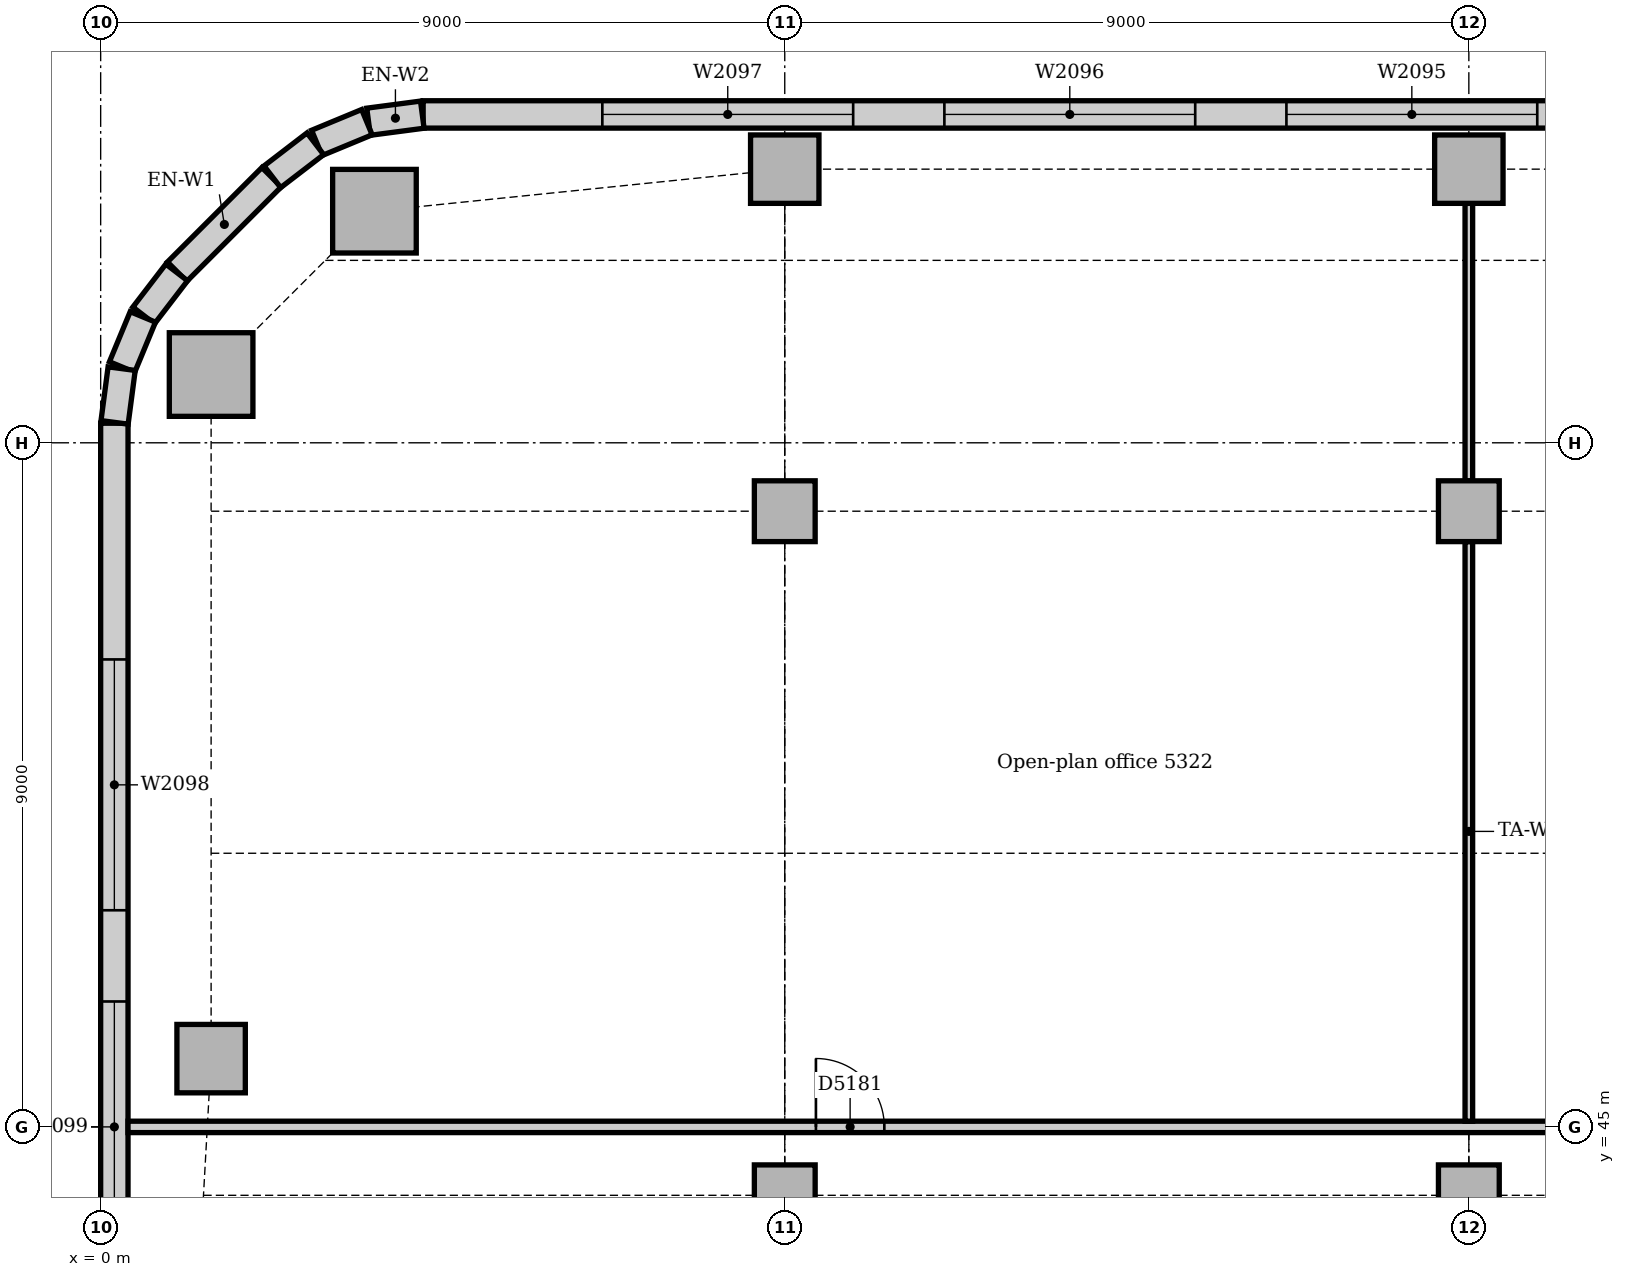
"""IFC4 building model, lengths in metres.
Left out: names, types, materials, properties, quantities, classifications, styles, units other than length and angle.
Written with IfcOpenShell. Run it as: python <this file> out.ifc"""

import sys

from ifc_helpers import new_model, si_unit, direction, frame, frame_2d, origin, origin_2d, place, context, subcontext, project, spatial, rectangle, extrude, element, fill, save


model = new_model("IFC4")
c1 = context("Model", 3, precision=1e-05, world=origin(), true_north=direction((0.0, 1.0)))
c2 = subcontext(c1, "Body", "Model", "MODEL_VIEW")
j1 = project(units=[si_unit("LENGTHUNIT", "METRE"), si_unit("PLANEANGLEUNIT", "RADIAN")], contexts=[c1])
p1 = place(None, origin())
s1 = spatial("IfcSite", under=j1, at=p1, CompositionType="ELEMENT")
p2 = place(p1, origin())
s2 = spatial("IfcBuilding", under=s1, at=p2, CompositionType="ELEMENT")
p3 = place(p2, frame((0.0, 0.0, 222.0)))
s3 = spatial("IfcBuildingStorey", under=s2, at=p3, CompositionType="ELEMENT", Elevation=222.0)
for number, where, z_axis, x_axis in (
    (1, (3.602, 57.047, 0.0), (0.0, 0.0, 1.0), (1.0, 0.0, 0.0)),
    (2, (1.453, 54.898, 0.0), (0.0, 0.0, 1.0), (1.0, 0.0, 0.0)),
):
    element("IfcColumn", number, at=place(p3, frame(where, z_axis=z_axis, x_axis=x_axis)), inside=s3, PredefinedType="COLUMN", context=c2, shape_type="SweptSolid", body=[
        extrude(rectangle(XDim=1.1, YDim=1.1, at=origin_2d()), origin(), (0.0, 0.0, 1.0), 3.85),
    ])
for number, where, z_axis, x_axis in (
    (3, (9.0, 57.6, 0.0), (0.0, 0.0, 1.0), (1.0, 0.0, 0.0)),
    (4, (18.0, 57.6, 0.0), (0.0, 0.0, 1.0), (1.0, 0.0, 0.0)),
    (5, (1.453, 45.898, 0.0), (0.0, 0.0, 1.0), (1.0, 0.0, 0.0)),
):
    element("IfcColumn", number, at=place(p3, frame(where, z_axis=z_axis, x_axis=x_axis)), inside=s3, PredefinedType="COLUMN", context=c2, shape_type="SweptSolid", body=[
        extrude(rectangle(XDim=0.9, YDim=0.9, at=origin_2d()), origin(), (0.0, 0.0, 1.0), 3.85),
    ])
for number, where, z_axis, x_axis in (
    (6, (9.0, 44.1, 0.0), (0.0, 0.0, 1.0), (1.0, 0.0, 0.0)),
    (7, (9.0, 53.1, 0.0), (0.0, 0.0, 1.0), (1.0, 0.0, 0.0)),
    (8, (18.0, 44.1, 0.0), (0.0, 0.0, 1.0), (1.0, 0.0, 0.0)),
    (9, (18.0, 53.1, 0.0), (0.0, 0.0, 1.0), (1.0, 0.0, 0.0)),
):
    element("IfcColumn", number, at=place(p3, frame(where, z_axis=z_axis, x_axis=x_axis)), inside=s3, PredefinedType="COLUMN", context=c2, shape_type="SweptSolid", body=[
        extrude(rectangle(XDim=0.8, YDim=0.8, at=origin_2d()), origin(), (0.0, 0.0, 1.0), 3.85),
    ])
p4 = place(p3, frame((34.757, 58.32, 0.0), z_axis=(0.0, 0.0, 1.0), x_axis=(-1.0, 0.0, 0.0)))
e10 = element("IfcWall", 10, at=p4, inside=s3, PredefinedType="STANDARD", context=c2, shape_type="SweptSolid", body=[
    extrude(rectangle(XDim=30.515, YDim=0.36, at=frame_2d((15.257, 0.0))), origin(), (0.0, 0.0, 1.0), 3.85),
])
p5 = place(p4, frame((2.357, 0.0, 0.9)))
e11 = element("IfcOpeningElement", 11, at=p5, cuts=e10, PredefinedType="OPENING", context=c2, shape_type="SweptSolid", body=[
    extrude(rectangle(XDim=3.3, YDim=1.6, at=frame_2d((1.65, 0.8))), frame((0.0, 0.19, 0.0), z_axis=(0.0, -1.0, 0.0), x_axis=(1.0, 0.0, 0.0)), (0.0, 0.0, 1.0), 0.38),
])
p6 = place(p4, frame((6.857, 0.0, 0.9)))
e12 = element("IfcOpeningElement", 12, at=p6, cuts=e10, PredefinedType="OPENING", context=c2, shape_type="SweptSolid", body=[
    extrude(rectangle(XDim=3.3, YDim=1.6, at=frame_2d((1.65, 0.8))), frame((0.0, 0.19, 0.0), z_axis=(0.0, -1.0, 0.0), x_axis=(1.0, 0.0, 0.0)), (0.0, 0.0, 1.0), 0.38),
])
p7 = place(p4, frame((11.357, 0.0, 0.9)))
e13 = element("IfcOpeningElement", 13, at=p7, cuts=e10, PredefinedType="OPENING", context=c2, shape_type="SweptSolid", body=[
    extrude(rectangle(XDim=3.3, YDim=1.6, at=frame_2d((1.65, 0.8))), frame((0.0, 0.19, 0.0), z_axis=(0.0, -1.0, 0.0), x_axis=(1.0, 0.0, 0.0)), (0.0, 0.0, 1.0), 0.38),
])
p8 = place(p4, frame((15.857, 0.0, 0.9)))
e14 = element("IfcOpeningElement", 14, at=p8, cuts=e10, PredefinedType="OPENING", context=c2, shape_type="SweptSolid", body=[
    extrude(rectangle(XDim=3.3, YDim=1.6, at=frame_2d((1.65, 0.8))), frame((0.0, 0.19, 0.0), z_axis=(0.0, -1.0, 0.0), x_axis=(1.0, 0.0, 0.0)), (0.0, 0.0, 1.0), 0.38),
])
p9 = place(p4, frame((20.357, 0.0, 0.9)))
e15 = element("IfcOpeningElement", 15, at=p9, cuts=e10, PredefinedType="OPENING", context=c2, shape_type="SweptSolid", body=[
    extrude(rectangle(XDim=3.3, YDim=1.6, at=frame_2d((1.65, 0.8))), frame((0.0, 0.19, 0.0), z_axis=(0.0, -1.0, 0.0), x_axis=(1.0, 0.0, 0.0)), (0.0, 0.0, 1.0), 0.38),
])
p10 = place(p4, frame((24.857, 0.0, 0.9)))
e16 = element("IfcOpeningElement", 16, at=p10, cuts=e10, PredefinedType="OPENING", context=c2, shape_type="SweptSolid", body=[
    extrude(rectangle(XDim=3.3, YDim=1.6, at=frame_2d((1.65, 0.8))), frame((0.0, 0.19, 0.0), z_axis=(0.0, -1.0, 0.0), x_axis=(1.0, 0.0, 0.0)), (0.0, 0.0, 1.0), 0.38),
])
p11 = place(p3, frame((2.249, 57.494, 0.0), z_axis=(0.0, 0.0, 1.0), x_axis=(-0.707106781187, -0.707106781187, 0.0)))
e17 = element("IfcWall", 17, at=p11, inside=s3, PredefinedType="STANDARD", context=c2, shape_type="SweptSolid", body=[
    extrude(rectangle(XDim=1.757, YDim=0.36, at=frame_2d((0.879, 0.0))), origin(), (0.0, 0.0, 1.0), 3.85),
])
p12 = place(p3, frame((0.18, 54.257, 0.0), z_axis=(0.0, 0.0, 1.0), x_axis=(0.0, -1.0, 0.0)))
e18 = element("IfcWall", 18, at=p12, inside=s3, PredefinedType="STANDARD", context=c2, shape_type="SweptSolid", body=[
    extrude(rectangle(XDim=12.257, YDim=0.36, at=frame_2d((6.129, 0.0))), origin(), (0.0, 0.0, 1.0), 3.85),
])
p13 = place(p12, frame((3.107, 0.0, 0.9)))
e19 = element("IfcOpeningElement", 19, at=p13, cuts=e18, PredefinedType="OPENING", context=c2, shape_type="SweptSolid", body=[
    extrude(rectangle(XDim=3.3, YDim=1.6, at=frame_2d((1.65, 0.8))), frame((0.0, 0.19, 0.0), z_axis=(0.0, -1.0, 0.0), x_axis=(1.0, 0.0, 0.0)), (0.0, 0.0, 1.0), 0.38),
])
p14 = place(p12, frame((7.607, 0.0, 0.9)))
e20 = element("IfcOpeningElement", 20, at=p14, cuts=e18, PredefinedType="OPENING", context=c2, shape_type="SweptSolid", body=[
    extrude(rectangle(XDim=3.3, YDim=1.6, at=frame_2d((1.65, 0.8))), frame((0.0, 0.19, 0.0), z_axis=(0.0, -1.0, 0.0), x_axis=(1.0, 0.0, 0.0)), (0.0, 0.0, 1.0), 0.38),
])
for number, where, z_axis, x_axis in (
    (21, (4.231, 58.317, 0.0), (0.0, 0.0, 1.0), (-0.991, -0.131, 0.0)),
    (22, (3.503, 58.218, 0.0), (0.0, 0.0, 1.0), (-0.924, -0.383, 0.0)),
):
    element("IfcWall", number, at=place(p3, frame(where, z_axis=z_axis, x_axis=x_axis)), inside=s3, PredefinedType="STANDARD", context=c2, shape_type="SweptSolid", body=[
        extrude(rectangle(XDim=0.713, YDim=0.36, at=frame_2d((0.356, 0.0))), origin(), (0.0, 0.0, 1.0), 3.85),
    ])
for number, where, z_axis, x_axis in (
    (23, (2.825, 57.934, 0.0), (0.0, 0.0, 1.0), (-0.793, -0.609, 0.0)),
    (24, (1.0, 56.241, 0.0), (0.0, 0.0, 1.0), (-0.609, -0.793, 0.0)),
):
    element("IfcWall", number, at=place(p3, frame(where, z_axis=z_axis, x_axis=x_axis)), inside=s3, PredefinedType="STANDARD", context=c2, shape_type="SweptSolid", body=[
        extrude(rectangle(XDim=0.713, YDim=0.36, at=frame_2d((0.357, 0.0))), origin(), (0.0, 0.0, 1.0), 3.85),
    ])
for number, where, z_axis, x_axis in (
    (25, (0.555, 55.656, 0.0), (0.0, 0.0, 1.0), (-0.383, -0.924, 0.0)),
    (26, (0.276, 54.976, 0.0), (0.0, 0.0, 1.0), (-0.131, -0.991, 0.0)),
):
    element("IfcWall", number, at=place(p3, frame(where, z_axis=z_axis, x_axis=x_axis)), inside=s3, PredefinedType="STANDARD", context=c2, shape_type="SweptSolid", body=[
        extrude(rectangle(XDim=0.713, YDim=0.36, at=frame_2d((0.356, 0.0))), origin(), (0.0, 0.0, 1.0), 3.85),
    ])
p15 = place(p3, frame((0.36, 45.0, 0.0), z_axis=(0.0, 0.0, 1.0), x_axis=(1.0, 0.0, 0.0)))
e27 = element("IfcWall", 27, at=p15, inside=s3, PredefinedType="PARTITIONING", context=c2, shape_type="SweptSolid", body=[
    extrude(rectangle(XDim=44.28, YDim=0.15, at=frame_2d((22.14, 0.0))), origin(), (0.0, 0.0, 1.0), 3.85),
])
p16 = place(p15, frame((9.05, 0.0, 0.0)))
e28 = element("IfcOpeningElement", 28, at=p16, cuts=e27, PredefinedType="OPENING", context=c2, shape_type="SweptSolid", body=[
    extrude(rectangle(XDim=0.9, YDim=2.1, at=frame_2d((0.45, 1.05))), frame((0.0, 0.085, 0.0), z_axis=(0.0, -1.0, 0.0), x_axis=(1.0, 0.0, 0.0)), (0.0, 0.0, 1.0), 0.17),
])
p17 = place(p15, frame((21.69, 0.0, 0.0)))
e29 = element("IfcOpeningElement", 29, at=p17, cuts=e27, PredefinedType="OPENING", context=c2, shape_type="SweptSolid", body=[
    extrude(rectangle(XDim=0.9, YDim=2.1, at=frame_2d((0.45, 1.05))), frame((0.0, 0.085, 0.0), z_axis=(0.0, -1.0, 0.0), x_axis=(1.0, 0.0, 0.0)), (0.0, 0.0, 1.0), 0.17),
])
p18 = place(p15, frame((34.24, 0.0, 0.0)))
e30 = element("IfcOpeningElement", 30, at=p18, cuts=e27, PredefinedType="OPENING", context=c2, shape_type="SweptSolid", body=[
    extrude(rectangle(XDim=1.0, YDim=2.1, at=frame_2d((0.5, 1.05))), frame((0.0, 0.085, 0.0), z_axis=(0.0, -1.0, 0.0), x_axis=(1.0, 0.0, 0.0)), (0.0, 0.0, 1.0), 0.17),
])
p19 = place(p3, frame((18.0, 45.075, 0.0), z_axis=(0.0, 0.0, 1.0), x_axis=(0.0, 1.0, 0.0)))
e31 = element("IfcWall", 31, at=p19, inside=s3, PredefinedType="PARTITIONING", context=c2, shape_type="SweptSolid", body=[
    extrude(rectangle(XDim=7.625, YDim=0.1, at=frame_2d((3.812, 0.0))), origin(), (0.0, 0.0, 1.0), 3.35),
])
p20 = place(p3, frame((18.0, 53.5, 0.0), z_axis=(0.0, 0.0, 1.0), x_axis=(0.0, 1.0, 0.0)))
e32 = element("IfcWall", 32, at=p20, inside=s3, PredefinedType="PARTITIONING", context=c2, shape_type="SweptSolid", body=[
    extrude(rectangle(XDim=3.65, YDim=0.1, at=frame_2d((1.825, 0.0))), origin(), (0.0, 0.0, 1.0), 3.41),
])
p21 = place(p8, origin())
e33 = element("IfcWindow", 33, at=p21, inside=s3, PartitioningType="SINGLE_PANEL", PredefinedType="WINDOW", context=c2, shape_type="SweptSolid", body=[
    extrude(rectangle(XDim=3.3, YDim=1.6, at=frame_2d((1.65, 0.8))), frame((0.0, 0.13, 0.0), z_axis=(0.0, -1.0, 0.0), x_axis=(1.0, 0.0, 0.0)), (0.0, 0.0, 1.0), 0.06),
])
fill(e14, e33)
p22 = place(p9, origin())
e34 = element("IfcWindow", 34, at=p22, inside=s3, PartitioningType="SINGLE_PANEL", PredefinedType="WINDOW", context=c2, shape_type="SweptSolid", body=[
    extrude(rectangle(XDim=3.3, YDim=1.6, at=frame_2d((1.65, 0.8))), frame((0.0, 0.13, 0.0), z_axis=(0.0, -1.0, 0.0), x_axis=(1.0, 0.0, 0.0)), (0.0, 0.0, 1.0), 0.06),
])
fill(e15, e34)
p23 = place(p10, origin())
e35 = element("IfcWindow", 35, at=p23, inside=s3, PartitioningType="SINGLE_PANEL", PredefinedType="WINDOW", context=c2, shape_type="SweptSolid", body=[
    extrude(rectangle(XDim=3.3, YDim=1.6, at=frame_2d((1.65, 0.8))), frame((0.0, 0.13, 0.0), z_axis=(0.0, -1.0, 0.0), x_axis=(1.0, 0.0, 0.0)), (0.0, 0.0, 1.0), 0.06),
])
fill(e16, e35)
p24 = place(p13, origin())
e36 = element("IfcWindow", 36, at=p24, inside=s3, PartitioningType="SINGLE_PANEL", PredefinedType="WINDOW", context=c2, shape_type="SweptSolid", body=[
    extrude(rectangle(XDim=3.3, YDim=1.6, at=frame_2d((1.65, 0.8))), frame((0.0, 0.13, 0.0), z_axis=(0.0, -1.0, 0.0), x_axis=(1.0, 0.0, 0.0)), (0.0, 0.0, 1.0), 0.06),
])
fill(e19, e36)
p25 = place(p14, origin())
e37 = element("IfcWindow", 37, at=p25, inside=s3, PartitioningType="SINGLE_PANEL", PredefinedType="WINDOW", context=c2, shape_type="SweptSolid", body=[
    extrude(rectangle(XDim=3.3, YDim=1.6, at=frame_2d((1.65, 0.8))), frame((0.0, 0.13, 0.0), z_axis=(0.0, -1.0, 0.0), x_axis=(1.0, 0.0, 0.0)), (0.0, 0.0, 1.0), 0.06),
])
fill(e20, e37)
p26 = place(p16, origin())
e38 = element("IfcDoor", 38, at=p26, inside=s3, OperationType="SINGLE_SWING_LEFT", PredefinedType="DOOR", context=c2, shape_type="SweptSolid", body=[
    extrude(rectangle(XDim=0.9, YDim=2.1, at=frame_2d((0.45, 1.05))), frame((0.0, 0.025, 0.0), z_axis=(0.0, -1.0, 0.0), x_axis=(1.0, 0.0, 0.0)), (0.0, 0.0, 1.0), 0.05),
])
fill(e28, e38)
save(model, sys.argv[1])
